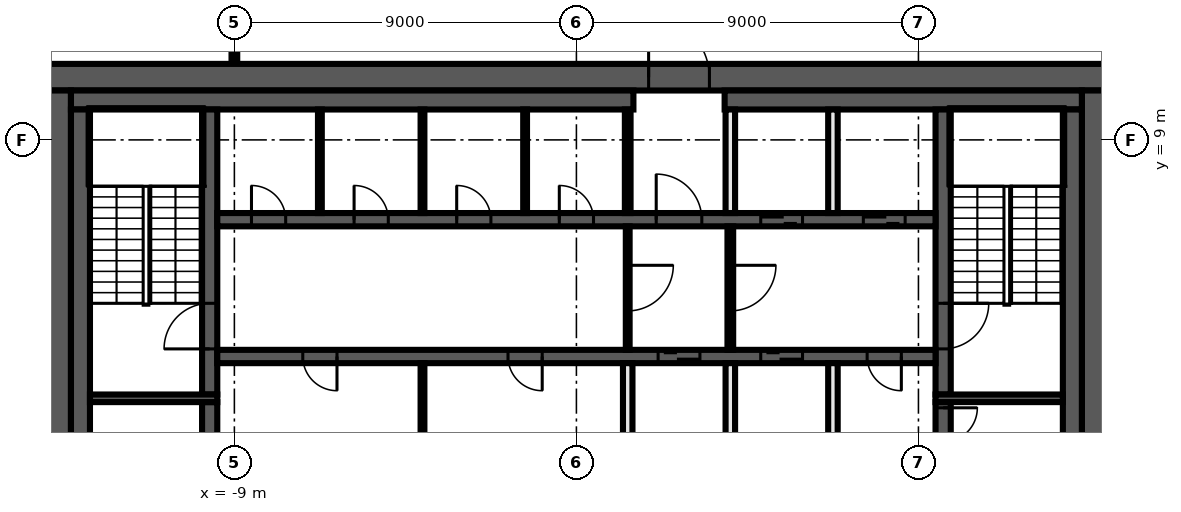
"""IFC4 building model, lengths in metres.
Left out: names, types, materials, properties, quantities, classifications, styles, units other than length and angle.
Written with IfcOpenShell. Run it as: python <this file> out.ifc"""

import sys

from ifc_helpers import new_model, si_unit, direction, frame, frame_2d, origin, place, context, subcontext, project, spatial, rectangle, extrude, element, fill, save


model = new_model("IFC4")
c1 = context("Model", 3, precision=1e-05, world=origin(), true_north=direction((0.0, 1.0)))
c2 = subcontext(c1, "Body", "Model", "MODEL_VIEW")
j1 = project(units=[si_unit("LENGTHUNIT", "METRE"), si_unit("PLANEANGLEUNIT", "RADIAN")], contexts=[c1])
p1 = place(None, origin())
s1 = spatial("IfcSite", under=j1, at=p1, CompositionType="ELEMENT")
p2 = place(p1, origin())
s2 = spatial("IfcBuilding", under=s1, at=p2, CompositionType="ELEMENT")
p3 = place(p2, frame((0.0, 0.0, 245.4)))
s3 = spatial("IfcBuildingStorey", under=s2, at=p3, CompositionType="ELEMENT", Elevation=245.4)
p4 = place(p3, frame((-9.0, 11.0, 0.0), z_axis=(0.0, 0.0, 1.0), x_axis=(0.0, 1.0, 0.0)))
e1 = element("IfcWall", 1, at=p4, inside=s3, PredefinedType="PARTITIONING", context=c2, shape_type="SweptSolid", body=[
    extrude(rectangle(XDim=2.925, YDim=0.15, at=frame_2d((1.462, 0.0))), origin(), (0.0, 0.0, 1.0), 3.82),
])
p5 = place(p3, frame((-14.0, 10.65, 0.0), z_axis=(0.0, 0.0, 1.0), x_axis=(1.0, 0.0, 0.0)))
e2 = element("IfcWall", 2, at=p5, inside=s3, PredefinedType="SHEAR", context=c2, shape_type="SweptSolid", body=[
    extrude(rectangle(XDim=28.0, YDim=0.7, at=frame_2d((14.0, 0.0))), origin(), (0.0, 0.0, 1.0), 3.82),
])
p6 = place(p5, frame((15.9, 0.0, 0.0)))
e3 = element("IfcOpeningElement", 3, at=p6, cuts=e2, PredefinedType="OPENING", context=c2, shape_type="SweptSolid", body=[
    extrude(rectangle(XDim=1.6, YDim=2.1, at=frame_2d((0.8, 1.05))), frame((0.0, 0.36, 0.0), z_axis=(0.0, -1.0, 0.0), x_axis=(1.0, 0.0, 0.0)), (0.0, 0.0, 1.0), 0.72),
])
for number, where, z_axis, x_axis in (
    (4, (13.65, 10.3, 0.0), (0.0, 0.0, 1.0), (0.0, -1.0, 0.0)),
    (5, (-13.65, -10.3, 0.0), (0.0, 0.0, 1.0), (0.0, 1.0, 0.0)),
):
    element("IfcWall", number, at=place(p3, frame(where, z_axis=z_axis, x_axis=x_axis)), inside=s3, PredefinedType="SHEAR", context=c2, shape_type="SweptSolid", body=[
        extrude(rectangle(XDim=20.6, YDim=0.7, at=frame_2d((10.3, 0.0))), origin(), (0.0, 0.0, 1.0), 3.82),
    ])
p7 = place(p3, frame((-13.3, 10.05, 0.0), z_axis=(0.0, 0.0, 1.0), x_axis=(1.0, 0.0, 0.0)))
e6 = element("IfcWall", 6, at=p7, inside=s3, PredefinedType="SHEAR", context=c2, shape_type="SweptSolid", body=[
    extrude(rectangle(XDim=14.8, YDim=0.5, at=frame_2d((7.4, 0.0))), origin(), (0.0, 0.0, 1.0), 3.82),
])
p8 = place(p3, frame((3.9, 10.05, 0.0), z_axis=(0.0, 0.0, 1.0), x_axis=(1.0, 0.0, 0.0)))
e7 = element("IfcWall", 7, at=p8, inside=s3, PredefinedType="SHEAR", context=c2, shape_type="SweptSolid", body=[
    extrude(rectangle(XDim=9.4, YDim=0.5, at=frame_2d((4.7, 0.0))), origin(), (0.0, 0.0, 1.0), 3.82),
])
for number, where, z_axis, x_axis in (
    (8, (13.05, 9.8, 0.0), (0.0, 0.0, 1.0), (0.0, -1.0, 0.0)),
    (9, (-13.05, -9.8, 0.0), (0.0, 0.0, 1.0), (0.0, 1.0, 0.0)),
):
    element("IfcWall", number, at=place(p3, frame(where, z_axis=z_axis, x_axis=x_axis)), inside=s3, PredefinedType="SHEAR", context=c2, shape_type="SweptSolid", body=[
        extrude(rectangle(XDim=19.6, YDim=0.5, at=frame_2d((9.8, 0.0))), origin(), (0.0, 0.0, 1.0), 3.82),
    ])
p9 = place(p3, frame((9.65, 2.1, 0.0), z_axis=(0.0, 0.0, 1.0), x_axis=(0.0, -1.0, 0.0)))
e10 = element("IfcWall", 10, at=p9, inside=s3, PredefinedType="SHEAR", context=c2, shape_type="SweptSolid", body=[
    extrude(rectangle(XDim=4.2, YDim=0.4, at=frame_2d((2.1, 0.0))), origin(), (0.0, 0.0, 1.0), 3.82),
])
p10 = place(p9, frame((0.15, 0.0, 0.0)))
e11 = element("IfcOpeningElement", 11, at=p10, cuts=e10, PredefinedType="OPENING", context=c2, shape_type="SweptSolid", body=[
    extrude(rectangle(XDim=0.9, YDim=2.1, at=frame_2d((0.45, 1.05))), frame((0.0, 0.21, 0.0), z_axis=(0.0, -1.0, 0.0), x_axis=(1.0, 0.0, 0.0)), (0.0, 0.0, 1.0), 0.42),
])
p11 = place(p3, frame((9.65, 9.8, 0.0), z_axis=(0.0, 0.0, 1.0), x_axis=(0.0, -1.0, 0.0)))
e12 = element("IfcWall", 12, at=p11, inside=s3, PredefinedType="SHEAR", context=c2, shape_type="SweptSolid", body=[
    extrude(rectangle(XDim=7.5, YDim=0.4, at=frame_2d((3.75, 0.0))), origin(), (0.0, 0.0, 1.0), 3.82),
])
p12 = place(p11, frame((5.1, 0.0, 0.0)))
e13 = element("IfcOpeningElement", 13, at=p12, cuts=e12, PredefinedType="OPENING", context=c2, shape_type="SweptSolid", body=[
    extrude(rectangle(XDim=1.2, YDim=2.1, at=frame_2d((0.6, 1.05))), frame((0.0, 0.21, 0.0), z_axis=(0.0, -1.0, 0.0), x_axis=(1.0, 0.0, 0.0)), (0.0, 0.0, 1.0), 0.42),
])
p13 = place(p3, frame((-9.65, -2.1, 0.0), z_axis=(0.0, 0.0, 1.0), x_axis=(0.0, 1.0, 0.0)))
e14 = element("IfcWall", 14, at=p13, inside=s3, PredefinedType="SHEAR", context=c2, shape_type="SweptSolid", body=[
    extrude(rectangle(XDim=4.2, YDim=0.4, at=frame_2d((2.1, 0.0))), origin(), (0.0, 0.0, 1.0), 3.82),
])
p14 = place(p3, frame((-9.65, 2.3, 0.0), z_axis=(0.0, 0.0, 1.0), x_axis=(0.0, 1.0, 0.0)))
e15 = element("IfcWall", 15, at=p14, inside=s3, PredefinedType="SHEAR", context=c2, shape_type="SweptSolid", body=[
    extrude(rectangle(XDim=7.5, YDim=0.4, at=frame_2d((3.75, 0.0))), origin(), (0.0, 0.0, 1.0), 3.82),
])
p15 = place(p14, frame((1.2, 0.0, 0.0)))
e16 = element("IfcOpeningElement", 16, at=p15, cuts=e15, PredefinedType="OPENING", context=c2, shape_type="SweptSolid", body=[
    extrude(rectangle(XDim=1.2, YDim=2.1, at=frame_2d((0.6, 1.05))), frame((0.0, 0.21, 0.0), z_axis=(0.0, -1.0, 0.0), x_axis=(1.0, 0.0, 0.0)), (0.0, 0.0, 1.0), 0.42),
])
for number, where, z_axis, x_axis in (
    (17, (9.45, 2.2, 0.0), (0.0, 0.0, 1.0), (1.0, 0.0, 0.0)),
    (18, (-9.45, 2.2, 0.0), (0.0, 0.0, 1.0), (-1.0, 0.0, 0.0)),
):
    element("IfcWall", number, at=place(p3, frame(where, z_axis=z_axis, x_axis=x_axis)), inside=s3, PredefinedType="SHEAR", context=c2, shape_type="SweptSolid", body=[
        extrude(rectangle(XDim=3.35, YDim=0.2, at=frame_2d((1.675, 0.0))), origin(), (0.0, 0.0, 1.0), 3.82),
    ])
p16 = place(p3, frame((-9.45, 6.9, 0.0), z_axis=(0.0, 0.0, 1.0), x_axis=(1.0, 0.0, 0.0)))
e19 = element("IfcWall", 19, at=p16, inside=s3, PredefinedType="SHEAR", context=c2, shape_type="SweptSolid", body=[
    extrude(rectangle(XDim=18.9, YDim=0.35, at=frame_2d((9.45, 0.0))), origin(), (0.0, 0.0, 1.0), 3.82),
])
p17 = place(p16, frame((11.55, 0.0, 0.0)))
e20 = element("IfcOpeningElement", 20, at=p17, cuts=e19, PredefinedType="OPENING", context=c2, shape_type="SweptSolid", body=[
    extrude(rectangle(XDim=1.2, YDim=2.1, at=frame_2d((0.6, 1.05))), frame((0.0, 0.185, 0.0), z_axis=(0.0, -1.0, 0.0), x_axis=(1.0, 0.0, 0.0)), (0.0, 0.0, 1.0), 0.37),
])
p18 = place(p16, frame((14.3, 0.0, 0.0)))
e21 = element("IfcOpeningElement", 21, at=p18, cuts=e19, PredefinedType="OPENING", context=c2, shape_type="SweptSolid", body=[
    extrude(rectangle(XDim=1.1, YDim=2.1, at=frame_2d((0.55, 1.05))), frame((0.0, 0.185, 0.0), z_axis=(0.0, -1.0, 0.0), x_axis=(1.0, 0.0, 0.0)), (0.0, 0.0, 1.0), 0.37),
])
p19 = place(p16, frame((17.0, 0.0, 0.0)))
e22 = element("IfcOpeningElement", 22, at=p19, cuts=e19, PredefinedType="OPENING", context=c2, shape_type="SweptSolid", body=[
    extrude(rectangle(XDim=1.1, YDim=2.1, at=frame_2d((0.55, 1.05))), frame((0.0, 0.185, 0.0), z_axis=(0.0, -1.0, 0.0), x_axis=(1.0, 0.0, 0.0)), (0.0, 0.0, 1.0), 0.37),
])
p20 = place(p16, frame((0.9, 0.0, 0.0)))
e23 = element("IfcOpeningElement", 23, at=p20, cuts=e19, PredefinedType="OPENING", context=c2, shape_type="SweptSolid", body=[
    extrude(rectangle(XDim=0.9, YDim=2.1, at=frame_2d((0.45, 1.05))), frame((0.0, 0.185, 0.0), z_axis=(0.0, -1.0, 0.0), x_axis=(1.0, 0.0, 0.0)), (0.0, 0.0, 1.0), 0.37),
])
p21 = place(p16, frame((3.6, 0.0, 0.0)))
e24 = element("IfcOpeningElement", 24, at=p21, cuts=e19, PredefinedType="OPENING", context=c2, shape_type="SweptSolid", body=[
    extrude(rectangle(XDim=0.9, YDim=2.1, at=frame_2d((0.45, 1.05))), frame((0.0, 0.185, 0.0), z_axis=(0.0, -1.0, 0.0), x_axis=(1.0, 0.0, 0.0)), (0.0, 0.0, 1.0), 0.37),
])
p22 = place(p16, frame((6.3, 0.0, 0.0)))
e25 = element("IfcOpeningElement", 25, at=p22, cuts=e19, PredefinedType="OPENING", context=c2, shape_type="SweptSolid", body=[
    extrude(rectangle(XDim=0.9, YDim=2.1, at=frame_2d((0.45, 1.05))), frame((0.0, 0.185, 0.0), z_axis=(0.0, -1.0, 0.0), x_axis=(1.0, 0.0, 0.0)), (0.0, 0.0, 1.0), 0.37),
])
p23 = place(p16, frame((9.0, 0.0, 0.0)))
e26 = element("IfcOpeningElement", 26, at=p23, cuts=e19, PredefinedType="OPENING", context=c2, shape_type="SweptSolid", body=[
    extrude(rectangle(XDim=0.9, YDim=2.1, at=frame_2d((0.45, 1.05))), frame((0.0, 0.185, 0.0), z_axis=(0.0, -1.0, 0.0), x_axis=(1.0, 0.0, 0.0)), (0.0, 0.0, 1.0), 0.37),
])
p24 = place(p3, frame((9.45, 3.3, 0.0), z_axis=(0.0, 0.0, 1.0), x_axis=(-1.0, 0.0, 0.0)))
e27 = element("IfcWall", 27, at=p24, inside=s3, PredefinedType="SHEAR", context=c2, shape_type="SweptSolid", body=[
    extrude(rectangle(XDim=18.9, YDim=0.35, at=frame_2d((9.45, 0.0))), origin(), (0.0, 0.0, 1.0), 3.82),
])
p25 = place(p24, frame((6.2, 0.0, 0.0)))
e28 = element("IfcOpeningElement", 28, at=p25, cuts=e27, PredefinedType="OPENING", context=c2, shape_type="SweptSolid", body=[
    extrude(rectangle(XDim=1.1, YDim=2.1, at=frame_2d((0.55, 1.05))), frame((0.0, 0.185, 0.0), z_axis=(0.0, -1.0, 0.0), x_axis=(1.0, 0.0, 0.0)), (0.0, 0.0, 1.0), 0.37),
])
p26 = place(p24, frame((3.5, 0.0, 0.0)))
e29 = element("IfcOpeningElement", 29, at=p26, cuts=e27, PredefinedType="OPENING", context=c2, shape_type="SweptSolid", body=[
    extrude(rectangle(XDim=1.1, YDim=2.1, at=frame_2d((0.55, 1.05))), frame((0.0, 0.185, 0.0), z_axis=(0.0, -1.0, 0.0), x_axis=(1.0, 0.0, 0.0)), (0.0, 0.0, 1.0), 0.37),
])
p27 = place(p24, frame((0.9, 0.0, 0.0)))
e30 = element("IfcOpeningElement", 30, at=p27, cuts=e27, PredefinedType="OPENING", context=c2, shape_type="SweptSolid", body=[
    extrude(rectangle(XDim=0.9, YDim=2.1, at=frame_2d((0.45, 1.05))), frame((0.0, 0.185, 0.0), z_axis=(0.0, -1.0, 0.0), x_axis=(1.0, 0.0, 0.0)), (0.0, 0.0, 1.0), 0.37),
])
p28 = place(p24, frame((15.75, 0.0, 0.0)))
e31 = element("IfcOpeningElement", 31, at=p28, cuts=e27, PredefinedType="OPENING", context=c2, shape_type="SweptSolid", body=[
    extrude(rectangle(XDim=0.9, YDim=2.1, at=frame_2d((0.45, 1.05))), frame((0.0, 0.185, 0.0), z_axis=(0.0, -1.0, 0.0), x_axis=(1.0, 0.0, 0.0)), (0.0, 0.0, 1.0), 0.37),
])
p29 = place(p24, frame((10.35, 0.0, 0.0)))
e32 = element("IfcOpeningElement", 32, at=p29, cuts=e27, PredefinedType="OPENING", context=c2, shape_type="SweptSolid", body=[
    extrude(rectangle(XDim=0.9, YDim=2.1, at=frame_2d((0.45, 1.05))), frame((0.0, 0.185, 0.0), z_axis=(0.0, -1.0, 0.0), x_axis=(1.0, 0.0, 0.0)), (0.0, 0.0, 1.0), 0.37),
])
for number, where, z_axis, x_axis in (
    (33, (6.75, 0.4, 0.0), (0.0, 0.0, 1.0), (0.0, 1.0, 0.0)),
    (34, (6.75, 7.075, 0.0), (0.0, 0.0, 1.0), (0.0, 1.0, 0.0)),
):
    element("IfcWall", number, at=place(p3, frame(where, z_axis=z_axis, x_axis=x_axis)), inside=s3, PredefinedType="SOLIDWALL", context=c2, shape_type="SweptSolid", body=[
        extrude(rectangle(XDim=2.725, YDim=0.25, at=frame_2d((1.363, 0.0))), origin(), (0.0, 0.0, 1.0), 3.82),
    ])
p30 = place(p3, frame((4.05, 6.725, 0.0), z_axis=(0.0, 0.0, 1.0), x_axis=(0.0, -1.0, 0.0)))
e35 = element("IfcWall", 35, at=p30, inside=s3, PredefinedType="PARTITIONING", context=c2, shape_type="SweptSolid", body=[
    extrude(rectangle(XDim=3.25, YDim=0.15, at=frame_2d((1.625, 0.0))), origin(), (0.0, 0.0, 1.0), 3.82),
])
p31 = place(p30, frame((1.025, 0.0, 0.0)))
e36 = element("IfcOpeningElement", 36, at=p31, cuts=e35, PredefinedType="OPENING", context=c2, shape_type="SweptSolid", body=[
    extrude(rectangle(XDim=1.2, YDim=2.1, at=frame_2d((0.6, 1.05))), frame((0.0, 0.085, 0.0), z_axis=(0.0, -1.0, 0.0), x_axis=(1.0, 0.0, 0.0)), (0.0, 0.0, 1.0), 0.17),
])
for number, where, z_axis, x_axis in (
    (37, (4.05, 0.4, 0.0), (0.0, 0.0, 1.0), (0.0, 1.0, 0.0)),
    (38, (4.05, 7.075, 0.0), (0.0, 0.0, 1.0), (0.0, 1.0, 0.0)),
):
    element("IfcWall", number, at=place(p3, frame(where, z_axis=z_axis, x_axis=x_axis)), inside=s3, PredefinedType="SOLIDWALL", context=c2, shape_type="SweptSolid", body=[
        extrude(rectangle(XDim=2.725, YDim=0.25, at=frame_2d((1.363, 0.0))), origin(), (0.0, 0.0, 1.0), 3.82),
    ])
p32 = place(p3, frame((1.35, 7.075, 0.0), z_axis=(0.0, 0.0, 1.0), x_axis=(0.0, 1.0, 0.0)))
e39 = element("IfcWall", 39, at=p32, inside=s3, PredefinedType="PARTITIONING", context=c2, shape_type="SweptSolid", body=[
    extrude(rectangle(XDim=2.725, YDim=0.15, at=frame_2d((1.363, 0.0))), origin(), (0.0, 0.0, 1.0), 3.82),
])
p33 = place(p3, frame((1.35, 6.725, 0.0), z_axis=(0.0, 0.0, 1.0), x_axis=(0.0, -1.0, 0.0)))
e40 = element("IfcWall", 40, at=p33, inside=s3, PredefinedType="PARTITIONING", context=c2, shape_type="SweptSolid", body=[
    extrude(rectangle(XDim=3.25, YDim=0.1, at=frame_2d((1.625, 0.0))), origin(), (0.0, 0.0, 1.0), 3.82),
])
p34 = place(p33, frame((1.025, 0.0, 0.0)))
e41 = element("IfcOpeningElement", 41, at=p34, cuts=e40, PredefinedType="OPENING", context=c2, shape_type="SweptSolid", body=[
    extrude(rectangle(XDim=1.2, YDim=2.1, at=frame_2d((0.6, 1.05))), frame((0.0, 0.06, 0.0), z_axis=(0.0, -1.0, 0.0), x_axis=(1.0, 0.0, 0.0)), (0.0, 0.0, 1.0), 0.12),
])
p35 = place(p3, frame((1.35, 0.4, 0.0), z_axis=(0.0, 0.0, 1.0), x_axis=(0.0, 1.0, 0.0)))
e42 = element("IfcWall", 42, at=p35, inside=s3, PredefinedType="SOLIDWALL", context=c2, shape_type="SweptSolid", body=[
    extrude(rectangle(XDim=2.725, YDim=0.25, at=frame_2d((1.363, 0.0))), origin(), (0.0, 0.0, 1.0), 3.82),
])
for number, where, z_axis, x_axis in (
    (43, (-1.35, 7.075, 0.0), (0.0, 0.0, 1.0), (0.0, 1.0, 0.0)),
    (44, (-4.05, 0.4, 0.0), (0.0, 0.0, 1.0), (0.0, 1.0, 0.0)),
    (45, (-4.05, 7.075, 0.0), (0.0, 0.0, 1.0), (0.0, 1.0, 0.0)),
    (46, (-6.75, 7.075, 0.0), (0.0, 0.0, 1.0), (0.0, 1.0, 0.0)),
):
    element("IfcWall", number, at=place(p3, frame(where, z_axis=z_axis, x_axis=x_axis)), inside=s3, PredefinedType="PARTITIONING", context=c2, shape_type="SweptSolid", body=[
        extrude(rectangle(XDim=2.725, YDim=0.1, at=frame_2d((1.363, 0.0))), origin(), (0.0, 0.0, 1.0), 3.82),
    ])
p36 = place(p10, origin())
e47 = element("IfcDoor", 47, at=p36, inside=s3, OperationType="SINGLE_SWING_RIGHT", PredefinedType="DOOR", context=c2, shape_type="SweptSolid", body=[
    extrude(rectangle(XDim=0.9, YDim=2.1, at=frame_2d((0.45, 1.05))), frame((0.0, 0.025, 0.0), z_axis=(0.0, -1.0, 0.0), x_axis=(1.0, 0.0, 0.0)), (0.0, 0.0, 1.0), 0.05),
])
fill(e11, e47)
p37 = place(p6, origin())
e48 = element("IfcDoor", 48, at=p37, inside=s3, OperationType="DOUBLE_DOOR_SINGLE_SWING", PredefinedType="DOOR", context=c2, shape_type="SweptSolid", body=[
    extrude(rectangle(XDim=1.6, YDim=2.1, at=frame_2d((0.8, 1.05))), frame((0.0, 0.025, 0.0), z_axis=(0.0, -1.0, 0.0), x_axis=(1.0, 0.0, 0.0)), (0.0, 0.0, 1.0), 0.05),
])
fill(e3, e48)
p38 = place(p17, origin())
e49 = element("IfcDoor", 49, at=p38, inside=s3, OperationType="SINGLE_SWING_LEFT", PredefinedType="DOOR", context=c2, shape_type="SweptSolid", body=[
    extrude(rectangle(XDim=1.2, YDim=2.1, at=frame_2d((0.6, 1.05))), frame((0.0, 0.025, 0.0), z_axis=(0.0, -1.0, 0.0), x_axis=(1.0, 0.0, 0.0)), (0.0, 0.0, 1.0), 0.05),
])
fill(e20, e49)
p39 = place(p18, origin())
e50 = element("IfcDoor", 50, at=p39, inside=s3, OperationType="DOUBLE_DOOR_SLIDING", PredefinedType="DOOR", context=c2, shape_type="SweptSolid", body=[
    extrude(rectangle(XDim=1.1, YDim=2.1, at=frame_2d((0.55, 1.05))), frame((0.0, 0.025, 0.0), z_axis=(0.0, -1.0, 0.0), x_axis=(1.0, 0.0, 0.0)), (0.0, 0.0, 1.0), 0.05),
])
fill(e21, e50)
p40 = place(p19, origin())
e51 = element("IfcDoor", 51, at=p40, inside=s3, OperationType="DOUBLE_DOOR_SLIDING", PredefinedType="DOOR", context=c2, shape_type="SweptSolid", body=[
    extrude(rectangle(XDim=1.1, YDim=2.1, at=frame_2d((0.55, 1.05))), frame((0.0, 0.025, 0.0), z_axis=(0.0, -1.0, 0.0), x_axis=(1.0, 0.0, 0.0)), (0.0, 0.0, 1.0), 0.05),
])
fill(e22, e51)
p41 = place(p25, origin())
e52 = element("IfcDoor", 52, at=p41, inside=s3, OperationType="DOUBLE_DOOR_SLIDING", PredefinedType="DOOR", context=c2, shape_type="SweptSolid", body=[
    extrude(rectangle(XDim=1.1, YDim=2.1, at=frame_2d((0.55, 1.05))), frame((0.0, 0.025, 0.0), z_axis=(0.0, -1.0, 0.0), x_axis=(1.0, 0.0, 0.0)), (0.0, 0.0, 1.0), 0.05),
])
fill(e28, e52)
p42 = place(p26, origin())
e53 = element("IfcDoor", 53, at=p42, inside=s3, OperationType="DOUBLE_DOOR_SLIDING", PredefinedType="DOOR", context=c2, shape_type="SweptSolid", body=[
    extrude(rectangle(XDim=1.1, YDim=2.1, at=frame_2d((0.55, 1.05))), frame((0.0, 0.025, 0.0), z_axis=(0.0, -1.0, 0.0), x_axis=(1.0, 0.0, 0.0)), (0.0, 0.0, 1.0), 0.05),
])
fill(e29, e53)
p43 = place(p27, origin())
e54 = element("IfcDoor", 54, at=p43, inside=s3, OperationType="SINGLE_SWING_LEFT", PredefinedType="DOOR", context=c2, shape_type="SweptSolid", body=[
    extrude(rectangle(XDim=0.9, YDim=2.1, at=frame_2d((0.45, 1.05))), frame((0.0, 0.025, 0.0), z_axis=(0.0, -1.0, 0.0), x_axis=(1.0, 0.0, 0.0)), (0.0, 0.0, 1.0), 0.05),
])
fill(e30, e54)
p44 = place(p20, origin())
e55 = element("IfcDoor", 55, at=p44, inside=s3, OperationType="SINGLE_SWING_RIGHT", PredefinedType="DOOR", context=c2, shape_type="SweptSolid", body=[
    extrude(rectangle(XDim=0.9, YDim=2.1, at=frame_2d((0.45, 1.05))), frame((0.0, 0.025, 0.0), z_axis=(0.0, -1.0, 0.0), x_axis=(1.0, 0.0, 0.0)), (0.0, 0.0, 1.0), 0.05),
])
fill(e23, e55)
p45 = place(p21, origin())
e56 = element("IfcDoor", 56, at=p45, inside=s3, OperationType="SINGLE_SWING_LEFT", PredefinedType="DOOR", context=c2, shape_type="SweptSolid", body=[
    extrude(rectangle(XDim=0.9, YDim=2.1, at=frame_2d((0.45, 1.05))), frame((0.0, 0.025, 0.0), z_axis=(0.0, -1.0, 0.0), x_axis=(1.0, 0.0, 0.0)), (0.0, 0.0, 1.0), 0.05),
])
fill(e24, e56)
p46 = place(p22, origin())
e57 = element("IfcDoor", 57, at=p46, inside=s3, OperationType="SINGLE_SWING_RIGHT", PredefinedType="DOOR", context=c2, shape_type="SweptSolid", body=[
    extrude(rectangle(XDim=0.9, YDim=2.1, at=frame_2d((0.45, 1.05))), frame((0.0, 0.025, 0.0), z_axis=(0.0, -1.0, 0.0), x_axis=(1.0, 0.0, 0.0)), (0.0, 0.0, 1.0), 0.05),
])
fill(e25, e57)
p47 = place(p23, origin())
e58 = element("IfcDoor", 58, at=p47, inside=s3, OperationType="SINGLE_SWING_LEFT", PredefinedType="DOOR", context=c2, shape_type="SweptSolid", body=[
    extrude(rectangle(XDim=0.9, YDim=2.1, at=frame_2d((0.45, 1.05))), frame((0.0, 0.025, 0.0), z_axis=(0.0, -1.0, 0.0), x_axis=(1.0, 0.0, 0.0)), (0.0, 0.0, 1.0), 0.05),
])
fill(e26, e58)
p48 = place(p28, origin())
e59 = element("IfcDoor", 59, at=p48, inside=s3, OperationType="SINGLE_SWING_RIGHT", PredefinedType="DOOR", context=c2, shape_type="SweptSolid", body=[
    extrude(rectangle(XDim=0.9, YDim=2.1, at=frame_2d((0.45, 1.05))), frame((0.0, 0.025, 0.0), z_axis=(0.0, -1.0, 0.0), x_axis=(1.0, 0.0, 0.0)), (0.0, 0.0, 1.0), 0.05),
])
fill(e31, e59)
p49 = place(p29, origin())
e60 = element("IfcDoor", 60, at=p49, inside=s3, OperationType="SINGLE_SWING_LEFT", PredefinedType="DOOR", context=c2, shape_type="SweptSolid", body=[
    extrude(rectangle(XDim=0.9, YDim=2.1, at=frame_2d((0.45, 1.05))), frame((0.0, 0.025, 0.0), z_axis=(0.0, -1.0, 0.0), x_axis=(1.0, 0.0, 0.0)), (0.0, 0.0, 1.0), 0.05),
])
fill(e32, e60)
p50 = place(p12, origin())
e61 = element("IfcDoor", 61, at=p50, inside=s3, OperationType="SINGLE_SWING_LEFT", PredefinedType="DOOR", context=c2, shape_type="SweptSolid", body=[
    extrude(rectangle(XDim=1.2, YDim=2.1, at=frame_2d((0.6, 1.05))), frame((0.0, 0.025, 0.0), z_axis=(0.0, -1.0, 0.0), x_axis=(1.0, 0.0, 0.0)), (0.0, 0.0, 1.0), 0.05),
])
fill(e13, e61)
p51 = place(p15, origin())
e62 = element("IfcDoor", 62, at=p51, inside=s3, OperationType="SINGLE_SWING_RIGHT", PredefinedType="DOOR", context=c2, shape_type="SweptSolid", body=[
    extrude(rectangle(XDim=1.2, YDim=2.1, at=frame_2d((0.6, 1.05))), frame((0.0, 0.025, 0.0), z_axis=(0.0, -1.0, 0.0), x_axis=(1.0, 0.0, 0.0)), (0.0, 0.0, 1.0), 0.05),
])
fill(e16, e62)
p52 = place(p34, origin())
e63 = element("IfcDoor", 63, at=p52, inside=s3, OperationType="SINGLE_SWING_LEFT", PredefinedType="DOOR", context=c2, shape_type="SweptSolid", body=[
    extrude(rectangle(XDim=1.2, YDim=2.1, at=frame_2d((0.6, 1.05))), frame((0.0, 0.025, 0.0), z_axis=(0.0, -1.0, 0.0), x_axis=(1.0, 0.0, 0.0)), (0.0, 0.0, 1.0), 0.05),
])
fill(e41, e63)
p53 = place(p31, origin())
e64 = element("IfcDoor", 64, at=p53, inside=s3, OperationType="SINGLE_SWING_RIGHT", PredefinedType="DOOR", context=c2, shape_type="SweptSolid", body=[
    extrude(rectangle(XDim=1.2, YDim=2.1, at=frame_2d((0.6, 1.05))), frame((0.0, 0.025, 0.0), z_axis=(0.0, -1.0, 0.0), x_axis=(1.0, 0.0, 0.0)), (0.0, 0.0, 1.0), 0.05),
])
fill(e36, e64)
save(model, sys.argv[1])
